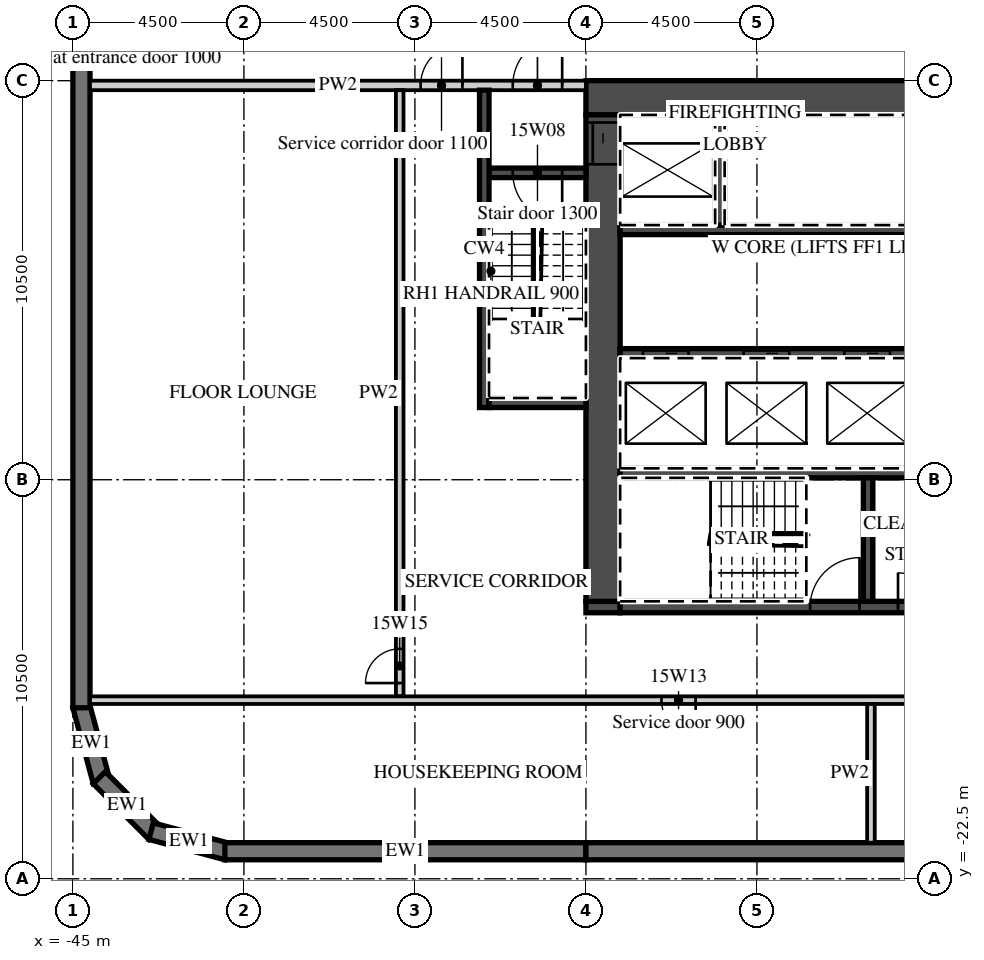
"""IFC4 building model, lengths in metres.
Left out: names, types, materials, properties, quantities, classifications, styles, units other than length and angle.
Written with IfcOpenShell. Run it as: python <this file> out.ifc"""

import sys

from ifc_helpers import new_model, si_unit, direction, frame, frame_2d, origin, place, context, subcontext, project, spatial, polyline, rectangle, outline, extrude, element, fill, save


model = new_model("IFC4")
c1 = context("Model", 3, precision=1e-05, world=origin(), true_north=direction((0.0, 1.0)))
c2 = subcontext(c1, "Body", "Model", "MODEL_VIEW")
j1 = project(units=[si_unit("LENGTHUNIT", "METRE"), si_unit("PLANEANGLEUNIT", "RADIAN")], contexts=[c1])
p1 = place(None, origin())
s1 = spatial("IfcSite", under=j1, at=p1, CompositionType="ELEMENT")
p2 = place(p1, origin())
s2 = spatial("IfcBuilding", under=s1, at=p2, CompositionType="ELEMENT")
p3 = place(p2, frame((0.0, 0.0, 79.8)))
s3 = spatial("IfcBuildingStorey", under=s2, at=p3, CompositionType="ELEMENT", Elevation=79.8)
p4 = place(p3, frame((-44.783, -17.942, 0.0), z_axis=(0.0, 0.0, 1.0), x_axis=(0.25881466832, -0.965926999034, 0.0)))
e1 = element("IfcWall", 1, at=p4, inside=s3, PredefinedType="SOLIDWALL", context=c2, shape_type="SweptSolid", body=[
    extrude(outline(polyline([(0.0, -0.225), (2.071, -0.225), (1.95, 0.225), (0.121, 0.225), (0.0, -0.225)])), origin(), (0.0, 0.0, 1.0), 3.02),
])
p5 = place(p3, frame((-44.305, -19.841, 0.0), z_axis=(0.0, 0.0, 1.0), x_axis=(0.707106781187, -0.707106781187, 0.0)))
e2 = element("IfcWall", 2, at=p5, inside=s3, PredefinedType="SOLIDWALL", context=c2, shape_type="SweptSolid", body=[
    extrude(outline(polyline([(0.0, -0.225), (2.071, -0.225), (1.95, 0.225), (0.121, 0.225), (0.0, -0.225)])), origin(), (0.0, 0.0, 1.0), 3.02),
])
p6 = place(p3, frame((-42.942, -21.247, 0.0), z_axis=(0.0, 0.0, 1.0), x_axis=(0.965926999034, -0.25881466832, 0.0)))
e3 = element("IfcWall", 3, at=p6, inside=s3, PredefinedType="SOLIDWALL", context=c2, shape_type="SweptSolid", body=[
    extrude(outline(polyline([(-0.0, -0.225), (2.07, -0.225), (1.95, 0.225), (0.12, 0.225), (-0.0, -0.225)])), origin(), (0.0, 0.0, 1.0), 3.02),
])
p7 = place(p3, frame((-41.0, -21.775, 0.0), z_axis=(0.0, 0.0, 1.0), x_axis=(1.0, 0.0, 0.0)))
e4 = element("IfcWall", 4, at=p7, inside=s3, PredefinedType="SOLIDWALL", context=c2, shape_type="SweptSolid", body=[
    extrude(rectangle(XDim=9.5, YDim=0.45, at=frame_2d((4.75, 0.0))), origin(), (0.0, 0.0, 1.0), 3.02),
])
p8 = place(p3, frame((-31.5, -21.775, 0.0), z_axis=(0.0, 0.0, 1.0), x_axis=(1.0, 0.0, 0.0)))
e5 = element("IfcWall", 5, at=p8, inside=s3, PredefinedType="SOLIDWALL", context=c2, shape_type="SweptSolid", body=[
    extrude(rectangle(XDim=18.0, YDim=0.45, at=frame_2d((9.0, 0.0))), origin(), (0.0, 0.0, 1.0), 3.02),
])
p9 = place(p3, frame((-44.775, 18.0, 0.0), z_axis=(0.0, 0.0, 1.0), x_axis=(0.0, -1.0, 0.0)))
e6 = element("IfcWall", 6, at=p9, inside=s3, PredefinedType="SOLIDWALL", context=c2, shape_type="SweptSolid", body=[
    extrude(rectangle(XDim=36.0, YDim=0.45, at=frame_2d((18.0, 0.0))), origin(), (0.0, 0.0, 1.0), 3.02),
])
p10 = place(p9, frame((3.9, 0.0, 0.45)))
e7 = element("IfcOpeningElement", 7, at=p10, cuts=e6, PredefinedType="OPENING", context=c2, shape_type="SweptSolid", body=[
    extrude(rectangle(XDim=3.3, YDim=2.25, at=frame_2d((1.65, 1.125))), frame((0.0, 0.235, 0.0), z_axis=(0.0, -1.0, 0.0), x_axis=(1.0, 0.0, 0.0)), (0.0, 0.0, 1.0), 0.47),
])
p11 = place(p9, frame((8.4, 0.0, 0.45)))
e8 = element("IfcOpeningElement", 8, at=p11, cuts=e6, PredefinedType="OPENING", context=c2, shape_type="SweptSolid", body=[
    extrude(rectangle(XDim=3.3, YDim=2.25, at=frame_2d((1.65, 1.125))), frame((0.0, 0.235, 0.0), z_axis=(0.0, -1.0, 0.0), x_axis=(1.0, 0.0, 0.0)), (0.0, 0.0, 1.0), 0.47),
])
p12 = place(p9, frame((12.9, 0.0, 0.45)))
e9 = element("IfcOpeningElement", 9, at=p12, cuts=e6, PredefinedType="OPENING", context=c2, shape_type="SweptSolid", body=[
    extrude(rectangle(XDim=3.3, YDim=2.25, at=frame_2d((1.65, 1.125))), frame((0.0, 0.235, 0.0), z_axis=(0.0, -1.0, 0.0), x_axis=(1.0, 0.0, 0.0)), (0.0, 0.0, 1.0), 0.47),
])
p13 = place(p3, frame((-31.5, -1.95, 0.0), z_axis=(0.0, 0.0, 1.0), x_axis=(1.0, 0.0, 0.0)))
e10 = element("IfcWall", 10, at=p13, inside=s3, PredefinedType="SHEAR", context=c2, shape_type="SweptSolid", body=[
    extrude(rectangle(XDim=18.0, YDim=0.9, at=frame_2d((9.0, 0.0))), origin(), (0.0, 0.0, 1.0), 3.02),
])
p14 = place(p13, frame((14.725, 0.0, 0.0)))
e11 = element("IfcOpeningElement", 11, at=p14, cuts=e10, PredefinedType="OPENING", context=c2, shape_type="SweptSolid", body=[
    extrude(rectangle(XDim=1.8, YDim=2.1, at=frame_2d((0.9, 1.05))), frame((0.0, 0.46, 0.0), z_axis=(0.0, -1.0, 0.0), x_axis=(1.0, 0.0, 0.0)), (0.0, 0.0, 1.0), 0.92),
])
p15 = place(p3, frame((-31.5, -15.35, 0.0), z_axis=(0.0, 0.0, 1.0), x_axis=(1.0, 0.0, 0.0)))
e12 = element("IfcWall", 12, at=p15, inside=s3, PredefinedType="SHEAR", context=c2, shape_type="SweptSolid", body=[
    extrude(rectangle(XDim=0.9, YDim=0.3, at=frame_2d((0.45, 0.0))), origin(), (0.0, 0.0, 1.0), 3.02),
])
p16 = place(p3, frame((-30.6, -15.35, 0.0), z_axis=(0.0, 0.0, 1.0), x_axis=(1.0, 0.0, 0.0)))
e13 = element("IfcWall", 13, at=p16, inside=s3, PredefinedType="SHEAR", context=c2, shape_type="SweptSolid", body=[
    extrude(rectangle(XDim=10.3, YDim=0.3, at=frame_2d((5.15, 0.0))), origin(), (0.0, 0.0, 1.0), 3.02),
])
p17 = place(p16, frame((5.0, 0.0, 0.0)))
e14 = element("IfcOpeningElement", 14, at=p17, cuts=e13, PredefinedType="OPENING", context=c2, shape_type="SweptSolid", body=[
    extrude(rectangle(XDim=1.3, YDim=2.1, at=frame_2d((0.65, 1.05))), frame((0.0, 0.16, 0.0), z_axis=(0.0, -1.0, 0.0), x_axis=(1.0, 0.0, 0.0)), (0.0, 0.0, 1.0), 0.32),
])
p18 = place(p16, frame((7.312, 0.0, 0.0)))
e15 = element("IfcOpeningElement", 15, at=p18, cuts=e13, PredefinedType="OPENING", context=c2, shape_type="SweptSolid", body=[
    extrude(rectangle(XDim=0.9, YDim=2.1, at=frame_2d((0.45, 1.05))), frame((0.0, 0.16, 0.0), z_axis=(0.0, -1.0, 0.0), x_axis=(1.0, 0.0, 0.0)), (0.0, 0.0, 1.0), 0.32),
])
p19 = place(p3, frame((-31.05, -15.2, 0.0), z_axis=(0.0, 0.0, 1.0), x_axis=(0.0, 1.0, 0.0)))
e16 = element("IfcWall", 16, at=p19, inside=s3, PredefinedType="SHEAR", context=c2, shape_type="SweptSolid", body=[
    extrude(rectangle(XDim=12.8, YDim=0.9, at=frame_2d((6.4, 0.0))), origin(), (0.0, 0.0, 1.0), 3.02),
])
p20 = place(p19, frame((11.5, 0.0, 0.0)))
e17 = element("IfcOpeningElement", 17, at=p20, cuts=e16, PredefinedType="OPENING", context=c2, shape_type="SweptSolid", body=[
    extrude(rectangle(XDim=1.1, YDim=2.1, at=frame_2d((0.55, 1.05))), frame((0.0, 0.46, 0.0), z_axis=(0.0, -1.0, 0.0), x_axis=(1.0, 0.0, 0.0)), (0.0, 0.0, 1.0), 0.92),
])
p21 = place(p3, frame((-30.6, -5.425, 0.0), z_axis=(0.0, 0.0, 1.0), x_axis=(1.0, 0.0, 0.0)))
e18 = element("IfcWall", 18, at=p21, inside=s3, PredefinedType="SHEAR", context=c2, shape_type="SweptSolid", body=[
    extrude(rectangle(XDim=13.0, YDim=0.25, at=frame_2d((6.5, 0.0))), origin(), (0.0, 0.0, 1.0), 3.02),
])
p22 = place(p3, frame((-27.975, -5.3, 0.0), z_axis=(0.0, 0.0, 1.0), x_axis=(0.0, 1.0, 0.0)))
e19 = element("IfcWall", 19, at=p22, inside=s3, PredefinedType="SHEAR", context=c2, shape_type="SweptSolid", body=[
    extrude(rectangle(XDim=2.9, YDim=0.25, at=frame_2d((1.45, 0.0))), origin(), (0.0, 0.0, 1.0), 3.02),
])
p23 = place(p3, frame((-30.6, -8.675, 0.0), z_axis=(0.0, 0.0, 1.0), x_axis=(1.0, 0.0, 0.0)))
e20 = element("IfcWall", 20, at=p23, inside=s3, PredefinedType="SHEAR", context=c2, shape_type="SweptSolid", body=[
    extrude(rectangle(XDim=16.2, YDim=0.25, at=frame_2d((8.1, 0.0))), origin(), (0.0, 0.0, 1.0), 3.02),
])
p24 = place(p23, frame((0.6, 0.0, 0.0)))
e21 = element("IfcOpeningElement", 21, at=p24, cuts=e20, PredefinedType="OPENING", context=c2, shape_type="SweptSolid", body=[
    extrude(rectangle(XDim=1.2, YDim=2.1, at=frame_2d((0.6, 1.05))), frame((0.0, 0.135, 0.0), z_axis=(0.0, -1.0, 0.0), x_axis=(1.0, 0.0, 0.0)), (0.0, 0.0, 1.0), 0.27),
])
p25 = place(p23, frame((3.25, 0.0, 0.0)))
e22 = element("IfcOpeningElement", 22, at=p25, cuts=e20, PredefinedType="OPENING", context=c2, shape_type="SweptSolid", body=[
    extrude(rectangle(XDim=1.2, YDim=2.1, at=frame_2d((0.6, 1.05))), frame((0.0, 0.135, 0.0), z_axis=(0.0, -1.0, 0.0), x_axis=(1.0, 0.0, 0.0)), (0.0, 0.0, 1.0), 0.27),
])
p26 = place(p23, frame((5.9, 0.0, 0.0)))
e23 = element("IfcOpeningElement", 23, at=p26, cuts=e20, PredefinedType="OPENING", context=c2, shape_type="SweptSolid", body=[
    extrude(rectangle(XDim=1.2, YDim=2.1, at=frame_2d((0.6, 1.05))), frame((0.0, 0.135, 0.0), z_axis=(0.0, -1.0, 0.0), x_axis=(1.0, 0.0, 0.0)), (0.0, 0.0, 1.0), 0.27),
])
p27 = place(p23, frame((14.25, 0.0, 0.0)))
e24 = element("IfcOpeningElement", 24, at=p27, cuts=e20, PredefinedType="OPENING", context=c2, shape_type="SweptSolid", body=[
    extrude(rectangle(XDim=1.3, YDim=2.1, at=frame_2d((0.65, 1.05))), frame((0.0, 0.135, 0.0), z_axis=(0.0, -1.0, 0.0), x_axis=(1.0, 0.0, 0.0)), (0.0, 0.0, 1.0), 0.27),
])
p28 = place(p3, frame((-30.6, -11.825, 0.0), z_axis=(0.0, 0.0, 1.0), x_axis=(1.0, 0.0, 0.0)))
e25 = element("IfcWall", 25, at=p28, inside=s3, PredefinedType="SHEAR", context=c2, shape_type="SweptSolid", body=[
    extrude(rectangle(XDim=13.25, YDim=0.25, at=frame_2d((6.625, 0.0))), origin(), (0.0, 0.0, 1.0), 3.02),
])
p29 = place(p3, frame((-24.075, -15.2, 0.0), z_axis=(0.0, 0.0, 1.0), x_axis=(0.0, 1.0, 0.0)))
e26 = element("IfcWall", 26, at=p29, inside=s3, PredefinedType="SHEAR", context=c2, shape_type="SweptSolid", body=[
    extrude(rectangle(XDim=3.25, YDim=0.25, at=frame_2d((1.625, 0.0))), origin(), (0.0, 0.0, 1.0), 3.02),
])
p30 = place(p3, frame((-44.55, -1.625, 0.0), z_axis=(0.0, 0.0, 1.0), x_axis=(1.0, 0.0, 0.0)))
e27 = element("IfcWall", 27, at=p30, inside=s3, PredefinedType="PARTITIONING", context=c2, shape_type="SweptSolid", body=[
    extrude(rectangle(XDim=13.05, YDim=0.25, at=frame_2d((6.525, 0.0))), origin(), (0.0, 0.0, 1.0), 3.02),
])
p31 = place(p30, frame((11.125, 0.0, 0.0)))
e28 = element("IfcOpeningElement", 28, at=p31, cuts=e27, PredefinedType="OPENING", context=c2, shape_type="SweptSolid", body=[
    extrude(rectangle(XDim=1.3, YDim=2.1, at=frame_2d((0.65, 1.05))), frame((0.0, 0.135, 0.0), z_axis=(0.0, -1.0, 0.0), x_axis=(1.0, 0.0, 0.0)), (0.0, 0.0, 1.0), 0.27),
])
p32 = place(p30, frame((8.7, 0.0, 0.0)))
e29 = element("IfcOpeningElement", 29, at=p32, cuts=e27, PredefinedType="OPENING", context=c2, shape_type="SweptSolid", body=[
    extrude(rectangle(XDim=1.1, YDim=2.1, at=frame_2d((0.55, 1.05))), frame((0.0, 0.135, 0.0), z_axis=(0.0, -1.0, 0.0), x_axis=(1.0, 0.0, 0.0)), (0.0, 0.0, 1.0), 0.27),
])
p33 = place(p3, frame((-34.05, -3.925, 0.0), z_axis=(0.0, 0.0, 1.0), x_axis=(1.0, 0.0, 0.0)))
e30 = element("IfcWall", 30, at=p33, inside=s3, PredefinedType="SHEAR", context=c2, shape_type="SweptSolid", body=[
    extrude(rectangle(XDim=2.55, YDim=0.25, at=frame_2d((1.275, 0.0))), origin(), (0.0, 0.0, 1.0), 3.02),
])
p34 = place(p33, frame((0.625, 0.0, 0.0)))
e31 = element("IfcOpeningElement", 31, at=p34, cuts=e30, PredefinedType="OPENING", context=c2, shape_type="SweptSolid", body=[
    extrude(rectangle(XDim=1.3, YDim=2.1, at=frame_2d((0.65, 1.05))), frame((0.0, 0.135, 0.0), z_axis=(0.0, -1.0, 0.0), x_axis=(1.0, 0.0, 0.0)), (0.0, 0.0, 1.0), 0.27),
])
p35 = place(p3, frame((-34.175, -10.1, 0.0), z_axis=(0.0, 0.0, 1.0), x_axis=(0.0, 1.0, 0.0)))
e32 = element("IfcWall", 32, at=p35, inside=s3, PredefinedType="SHEAR", context=c2, shape_type="SweptSolid", body=[
    extrude(rectangle(XDim=8.35, YDim=0.25, at=frame_2d((4.175, 0.0))), origin(), (0.0, 0.0, 1.0), 3.02),
])
p36 = place(p3, frame((-34.05, -9.975, 0.0), z_axis=(0.0, 0.0, 1.0), x_axis=(1.0, 0.0, 0.0)))
e33 = element("IfcWall", 33, at=p36, inside=s3, PredefinedType="SHEAR", context=c2, shape_type="SweptSolid", body=[
    extrude(rectangle(XDim=2.55, YDim=0.25, at=frame_2d((1.275, 0.0))), origin(), (0.0, 0.0, 1.0), 3.02),
])
p37 = place(p3, frame((-36.4, -17.7, 0.0), z_axis=(0.0, 0.0, 1.0), x_axis=(0.0, 1.0, 0.0)))
e34 = element("IfcWall", 34, at=p37, inside=s3, PredefinedType="PARTITIONING", context=c2, shape_type="SweptSolid", body=[
    extrude(rectangle(XDim=15.95, YDim=0.2, at=frame_2d((7.975, 0.0))), origin(), (0.0, 0.0, 1.0), 3.02),
])
p38 = place(p37, frame((0.35, 0.0, 0.0)))
e35 = element("IfcOpeningElement", 35, at=p38, cuts=e34, PredefinedType="OPENING", context=c2, shape_type="SweptSolid", body=[
    extrude(rectangle(XDim=0.9, YDim=2.1, at=frame_2d((0.45, 1.05))), frame((0.0, 0.11, 0.0), z_axis=(0.0, -1.0, 0.0), x_axis=(1.0, 0.0, 0.0)), (0.0, 0.0, 1.0), 0.22),
])
p39 = place(p3, frame((-44.55, -17.8, 0.0), z_axis=(0.0, 0.0, 1.0), x_axis=(1.0, 0.0, 0.0)))
e36 = element("IfcWall", 36, at=p39, inside=s3, PredefinedType="PARTITIONING", context=c2, shape_type="SweptSolid", body=[
    extrude(rectangle(XDim=30.95, YDim=0.2, at=frame_2d((15.475, 0.0))), origin(), (0.0, 0.0, 1.0), 3.02),
])
p40 = place(p39, frame((15.038, 0.0, 0.0)))
e37 = element("IfcOpeningElement", 37, at=p40, cuts=e36, PredefinedType="OPENING", context=c2, shape_type="SweptSolid", body=[
    extrude(rectangle(XDim=0.9, YDim=2.1, at=frame_2d((0.45, 1.05))), frame((0.0, 0.11, 0.0), z_axis=(0.0, -1.0, 0.0), x_axis=(1.0, 0.0, 0.0)), (0.0, 0.0, 1.0), 0.22),
])
p41 = place(p39, frame((23.337, 0.0, 0.0)))
e38 = element("IfcOpeningElement", 38, at=p41, cuts=e36, PredefinedType="OPENING", context=c2, shape_type="SweptSolid", body=[
    extrude(rectangle(XDim=0.9, YDim=2.1, at=frame_2d((0.45, 1.05))), frame((0.0, 0.11, 0.0), z_axis=(0.0, -1.0, 0.0), x_axis=(1.0, 0.0, 0.0)), (0.0, 0.0, 1.0), 0.22),
])
p42 = place(p3, frame((-24.0, -21.55, 0.0), z_axis=(0.0, 0.0, 1.0), x_axis=(0.0, 1.0, 0.0)))
e39 = element("IfcWall", 39, at=p42, inside=s3, PredefinedType="PARTITIONING", context=c2, shape_type="SweptSolid", body=[
    extrude(rectangle(XDim=3.65, YDim=0.2, at=frame_2d((1.825, 0.0))), origin(), (0.0, 0.0, 1.0), 3.02),
])
p43 = place(p24, origin())
e40 = element("IfcDoor", 40, at=p43, inside=s3, OperationType="SLIDING_TO_LEFT", PredefinedType="DOOR", context=c2, shape_type="SweptSolid", body=[
    extrude(rectangle(XDim=1.2, YDim=2.1, at=frame_2d((0.6, 1.05))), frame((0.0, 0.025, 0.0), z_axis=(0.0, -1.0, 0.0), x_axis=(1.0, 0.0, 0.0)), (0.0, 0.0, 1.0), 0.05),
])
fill(e21, e40)
p44 = place(p25, origin())
e41 = element("IfcDoor", 41, at=p44, inside=s3, OperationType="SLIDING_TO_RIGHT", PredefinedType="DOOR", context=c2, shape_type="SweptSolid", body=[
    extrude(rectangle(XDim=1.2, YDim=2.1, at=frame_2d((0.6, 1.05))), frame((0.0, 0.025, 0.0), z_axis=(0.0, -1.0, 0.0), x_axis=(1.0, 0.0, 0.0)), (0.0, 0.0, 1.0), 0.05),
])
fill(e22, e41)
p45 = place(p26, origin())
e42 = element("IfcDoor", 42, at=p45, inside=s3, OperationType="SLIDING_TO_RIGHT", PredefinedType="DOOR", context=c2, shape_type="SweptSolid", body=[
    extrude(rectangle(XDim=1.2, YDim=2.1, at=frame_2d((0.6, 1.05))), frame((0.0, 0.025, 0.0), z_axis=(0.0, -1.0, 0.0), x_axis=(1.0, 0.0, 0.0)), (0.0, 0.0, 1.0), 0.05),
])
fill(e23, e42)
p46 = place(p20, origin())
e43 = element("IfcDoor", 43, at=p46, inside=s3, OperationType="SLIDING_TO_RIGHT", PredefinedType="DOOR", context=c2, shape_type="SweptSolid", body=[
    extrude(rectangle(XDim=1.1, YDim=2.1, at=frame_2d((0.55, 1.05))), frame((0.0, 0.025, 0.0), z_axis=(0.0, -1.0, 0.0), x_axis=(1.0, 0.0, 0.0)), (0.0, 0.0, 1.0), 0.05),
])
fill(e17, e43)
p47 = place(p31, origin())
e44 = element("IfcDoor", 44, at=p47, inside=s3, OperationType="SINGLE_SWING_RIGHT", PredefinedType="DOOR", context=c2, shape_type="SweptSolid", body=[
    extrude(rectangle(XDim=1.3, YDim=2.1, at=frame_2d((0.65, 1.05))), frame((0.0, 0.025, 0.0), z_axis=(0.0, -1.0, 0.0), x_axis=(1.0, 0.0, 0.0)), (0.0, 0.0, 1.0), 0.05),
])
fill(e28, e44)
p48 = place(p34, origin())
e45 = element("IfcDoor", 45, at=p48, inside=s3, OperationType="SINGLE_SWING_RIGHT", PredefinedType="DOOR", context=c2, shape_type="SweptSolid", body=[
    extrude(rectangle(XDim=1.3, YDim=2.1, at=frame_2d((0.65, 1.05))), frame((0.0, 0.025, 0.0), z_axis=(0.0, -1.0, 0.0), x_axis=(1.0, 0.0, 0.0)), (0.0, 0.0, 1.0), 0.05),
])
fill(e31, e45)
p49 = place(p32, origin())
e46 = element("IfcDoor", 46, at=p49, inside=s3, OperationType="SINGLE_SWING_RIGHT", PredefinedType="DOOR", context=c2, shape_type="SweptSolid", body=[
    extrude(rectangle(XDim=1.1, YDim=2.1, at=frame_2d((0.55, 1.05))), frame((0.0, 0.025, 0.0), z_axis=(0.0, -1.0, 0.0), x_axis=(1.0, 0.0, 0.0)), (0.0, 0.0, 1.0), 0.05),
])
fill(e29, e46)
p50 = place(p17, origin())
e47 = element("IfcDoor", 47, at=p50, inside=s3, OperationType="SINGLE_SWING_RIGHT", PredefinedType="DOOR", context=c2, shape_type="SweptSolid", body=[
    extrude(rectangle(XDim=1.3, YDim=2.1, at=frame_2d((0.65, 1.05))), frame((0.0, 0.025, 0.0), z_axis=(0.0, -1.0, 0.0), x_axis=(1.0, 0.0, 0.0)), (0.0, 0.0, 1.0), 0.05),
])
fill(e14, e47)
p51 = place(p18, origin())
e48 = element("IfcDoor", 48, at=p51, inside=s3, OperationType="SINGLE_SWING_LEFT", PredefinedType="DOOR", context=c2, shape_type="SweptSolid", body=[
    extrude(rectangle(XDim=0.9, YDim=2.1, at=frame_2d((0.45, 1.05))), frame((0.0, 0.025, 0.0), z_axis=(0.0, -1.0, 0.0), x_axis=(1.0, 0.0, 0.0)), (0.0, 0.0, 1.0), 0.05),
])
fill(e15, e48)
p52 = place(p40, origin())
e49 = element("IfcDoor", 49, at=p52, inside=s3, OperationType="SINGLE_SWING_RIGHT", PredefinedType="DOOR", context=c2, shape_type="SweptSolid", body=[
    extrude(rectangle(XDim=0.9, YDim=2.1, at=frame_2d((0.45, 1.05))), frame((0.0, 0.025, 0.0), z_axis=(0.0, -1.0, 0.0), x_axis=(1.0, 0.0, 0.0)), (0.0, 0.0, 1.0), 0.05),
])
fill(e37, e49)
p53 = place(p38, origin())
e50 = element("IfcDoor", 50, at=p53, inside=s3, OperationType="SINGLE_SWING_LEFT", PredefinedType="DOOR", context=c2, shape_type="SweptSolid", body=[
    extrude(rectangle(XDim=0.9, YDim=2.1, at=frame_2d((0.45, 1.05))), frame((0.0, 0.025, 0.0), z_axis=(0.0, -1.0, 0.0), x_axis=(1.0, 0.0, 0.0)), (0.0, 0.0, 1.0), 0.05),
])
fill(e35, e50)
save(model, sys.argv[1])
